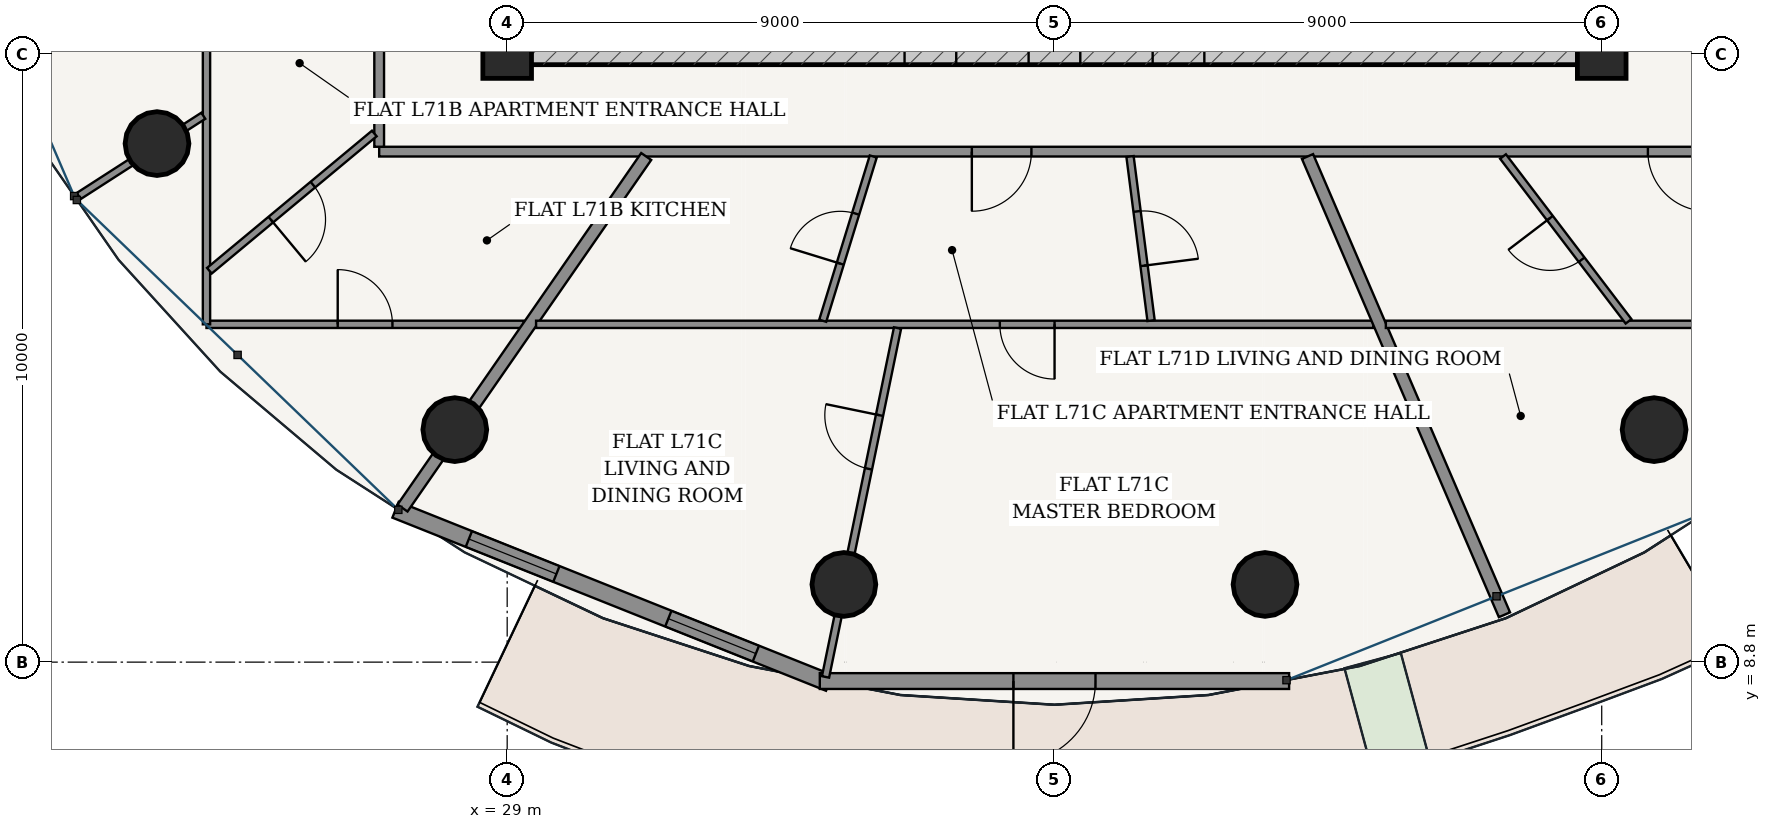
"""IFC4 building model, lengths in metres.
Left out: names, types, materials, properties, quantities, classifications, styles, units other than length and angle.
Written with IfcOpenShell. Run it as: python <this file> out.ifc"""

import sys

from ifc_helpers import new_model, si_unit, direction, frame, frame_2d, origin, origin_2d, place, context, subcontext, project, spatial, rectangle, hollow_circle, extrude, source, transform, mapped, element, fill, save


model = new_model("IFC4")
c1 = context("Model", 3, precision=1e-05, world=origin(), true_north=direction((-0.2419218956, 0.970295726276)))
c2 = subcontext(c1, "Body", "Model", "MODEL_VIEW")
j1 = project(units=[si_unit("LENGTHUNIT", "METRE"), si_unit("PLANEANGLEUNIT", "RADIAN")], contexts=[c1])
p1 = place(None, origin())
s1 = spatial("IfcSite", under=j1, at=p1, CompositionType="ELEMENT")
p2 = place(p1, origin())
s2 = spatial("IfcBuilding", under=s1, at=p2, CompositionType="ELEMENT")
p3 = place(p2, frame((0.0, 0.0, 270.7)))
s3 = spatial("IfcBuildingStorey", under=s2, at=p3, CompositionType="ELEMENT", Elevation=270.7)
for number, where, z_axis, x_axis in (
    (1, (29.0, 18.8, 0.0), (0.0, 0.0, 1.0), (1.0, 0.0, 0.0)),
    (2, (47.0, 18.8, 0.0), (0.0, 0.0, 1.0), (1.0, 0.0, 0.0)),
):
    element("IfcColumn", number, at=place(p3, frame(where, z_axis=z_axis, x_axis=x_axis)), inside=s3, PredefinedType="COLUMN", context=c2, shape_type="SweptSolid", body=[
        extrude(rectangle(XDim=0.8, YDim=0.8, at=origin_2d()), origin(), (0.0, 0.0, 1.0), 3.75),
    ])
p4 = place(p3, frame((28.825, 18.9, 0.0), z_axis=(0.0, 0.0, 1.0), x_axis=(1.0, 0.0, 0.0)))
e3 = element("IfcWall", 3, at=p4, inside=s3, PredefinedType="SHEAR", context=c2, shape_type="SweptSolid", body=[
    extrude(rectangle(XDim=18.35, YDim=0.55, at=frame_2d((9.175, 0.0))), origin(), (0.0, 0.0, 1.0), 3.49),
])
p5 = place(p4, frame((6.71, 0.0, 0.0)))
e4 = element("IfcOpeningElement", 4, at=p5, cuts=e3, PredefinedType="OPENING", context=c2, shape_type="SweptSolid", body=[
    extrude(rectangle(XDim=0.85, YDim=2.1, at=frame_2d((0.425, 1.05))), frame((0.0, 0.285, 0.0), z_axis=(0.0, -1.0, 0.0), x_axis=(1.0, 0.0, 0.0)), (0.0, 0.0, 1.0), 0.57),
])
p6 = place(p4, frame((8.75, 0.0, 0.0)))
e5 = element("IfcOpeningElement", 5, at=p6, cuts=e3, PredefinedType="OPENING", context=c2, shape_type="SweptSolid", body=[
    extrude(rectangle(XDim=0.85, YDim=2.1, at=frame_2d((0.425, 1.05))), frame((0.0, 0.285, 0.0), z_axis=(0.0, -1.0, 0.0), x_axis=(1.0, 0.0, 0.0)), (0.0, 0.0, 1.0), 0.57),
])
p7 = place(p4, frame((10.79, 0.0, 0.0)))
e6 = element("IfcOpeningElement", 6, at=p7, cuts=e3, PredefinedType="OPENING", context=c2, shape_type="SweptSolid", body=[
    extrude(rectangle(XDim=0.85, YDim=2.1, at=frame_2d((0.425, 1.05))), frame((0.0, 0.285, 0.0), z_axis=(0.0, -1.0, 0.0), x_axis=(1.0, 0.0, 0.0)), (0.0, 0.0, 1.0), 0.57),
])
for number, where, z_axis, x_axis in (
    (7, (23.241, 17.328, 0.0), (0.0, 0.0, 1.0), (1.0, 0.0, 0.0)),
    (8, (28.139, 12.624, 0.0), (0.0, 0.0, 1.0), (1.0, 0.0, 0.0)),
    (9, (34.537, 10.078, 0.0), (0.0, 0.0, 1.0), (1.0, 0.0, 0.0)),
    (10, (41.463, 10.078, 0.0), (0.0, 0.0, 1.0), (1.0, 0.0, 0.0)),
    (11, (47.861, 12.624, 0.0), (0.0, 0.0, 1.0), (1.0, 0.0, 0.0)),
):
    element("IfcColumn", number, at=place(p3, frame(where, z_axis=z_axis, x_axis=x_axis)), inside=s3, PredefinedType="COLUMN", context=c2, shape_type="SweptSolid", body=[
        extrude(hollow_circle(Radius=0.525, WallThickness=0.035, at=origin_2d()), origin(), (0.0, 0.0, 1.0), 3.75),
    ])
p8 = place(p3, frame((27.164, 11.306, 0.0), z_axis=(0.0, 0.0, 1.0), x_axis=(0.92871332341, -0.370798547626, 0.0)))
e12 = element("IfcWall", 12, at=p8, inside=s3, PredefinedType="SOLIDWALL", context=c2, shape_type="SweptSolid", body=[
    extrude(rectangle(XDim=7.678, YDim=0.28, at=frame_2d((3.839, 0.0))), origin(), (0.0, 0.0, 1.0), 3.49),
])
p9 = place(p8, frame((1.298, 0.0, 0.85)))
e13 = element("IfcOpeningElement", 13, at=p9, cuts=e12, PredefinedType="OPENING", context=c2, shape_type="SweptSolid", body=[
    extrude(rectangle(XDim=1.55, YDim=1.95, at=frame_2d((0.775, 0.975))), frame((0.0, 0.15, 0.0), z_axis=(0.0, -1.0, 0.0), x_axis=(1.0, 0.0, 0.0)), (0.0, 0.0, 1.0), 0.3),
])
p10 = place(p8, frame((4.83, 0.0, 0.85)))
e14 = element("IfcOpeningElement", 14, at=p10, cuts=e12, PredefinedType="OPENING", context=c2, shape_type="SweptSolid", body=[
    extrude(rectangle(XDim=1.55, YDim=1.95, at=frame_2d((0.775, 0.975))), frame((0.0, 0.15, 0.0), z_axis=(0.0, -1.0, 0.0), x_axis=(1.0, 0.0, 0.0)), (0.0, 0.0, 1.0), 0.3),
])
p11 = place(p3, frame((34.141, 8.489, 0.0), z_axis=(0.0, 0.0, 1.0), x_axis=(1.0, 0.0, 0.0)))
e15 = element("IfcWall", 15, at=p11, inside=s3, PredefinedType="SOLIDWALL", context=c2, shape_type="SweptSolid", body=[
    extrude(rectangle(XDim=7.718, YDim=0.26, at=frame_2d((3.859, 0.0))), origin(), (0.0, 0.0, 1.0), 3.49),
])
p12 = place(p11, frame((3.184, 0.0, 0.0)))
e16 = element("IfcOpeningElement", 16, at=p12, cuts=e15, PredefinedType="OPENING", context=c2, shape_type="SweptSolid", body=[
    extrude(rectangle(XDim=1.35, YDim=2.2, at=frame_2d((0.675, 1.1))), frame((0.0, 0.14, 0.0), z_axis=(0.0, -1.0, 0.0), x_axis=(1.0, 0.0, 0.0)), (0.0, 0.0, 1.0), 0.28),
])
p13 = place(p3, frame((26.895, 17.195, 0.0), z_axis=(0.0, 0.0, 1.0), x_axis=(1.0, 0.0, 0.0)))
e17 = element("IfcWall", 17, at=p13, inside=s3, PredefinedType="PARTITIONING", context=c2, shape_type="SweptSolid", body=[
    extrude(rectangle(XDim=22.21, YDim=0.16, at=frame_2d((11.105, 0.0))), origin(), (0.0, 0.0, 1.0), 3.015),
])
p14 = place(p13, frame((9.746, 0.0, 0.0)))
e18 = element("IfcOpeningElement", 18, at=p14, cuts=e17, PredefinedType="OPENING", context=c2, shape_type="SweptSolid", body=[
    extrude(rectangle(XDim=0.98, YDim=2.2, at=frame_2d((0.49, 1.1))), frame((0.0, 0.09, 0.0), z_axis=(0.0, -1.0, 0.0), x_axis=(1.0, 0.0, 0.0)), (0.0, 0.0, 1.0), 0.18),
])
p15 = place(p13, frame((20.864, 0.0, 0.0)))
e19 = element("IfcOpeningElement", 19, at=p15, cuts=e17, PredefinedType="OPENING", context=c2, shape_type="SweptSolid", body=[
    extrude(rectangle(XDim=0.98, YDim=2.2, at=frame_2d((0.49, 1.1))), frame((0.0, 0.09, 0.0), z_axis=(0.0, -1.0, 0.0), x_axis=(1.0, 0.0, 0.0)), (0.0, 0.0, 1.0), 0.18),
])
p16 = place(p3, frame((26.895, 17.275, 0.0), z_axis=(0.0, 0.0, 1.0), x_axis=(0.0, 1.0, 0.0)))
e20 = element("IfcWall", 20, at=p16, inside=s3, PredefinedType="PARTITIONING", context=c2, shape_type="SweptSolid", body=[
    extrude(rectangle(XDim=13.925, YDim=0.16, at=frame_2d((6.962, 0.0))), origin(), (0.0, 0.0, 1.0), 3.015),
])
p17 = place(p16, frame((2.735, 0.0, 0.0)))
e21 = element("IfcOpeningElement", 21, at=p17, cuts=e20, PredefinedType="OPENING", context=c2, shape_type="SweptSolid", body=[
    extrude(rectangle(XDim=0.98, YDim=2.2, at=frame_2d((0.49, 1.1))), frame((0.0, 0.09, 0.0), z_axis=(0.0, -1.0, 0.0), x_axis=(1.0, 0.0, 0.0)), (0.0, 0.0, 1.0), 0.18),
])
p18 = place(p3, frame((29.271, 14.355, 0.0), z_axis=(0.0, 0.0, 1.0), x_axis=(-1.0, 0.0, 0.0)))
e22 = element("IfcWall", 22, at=p18, inside=s3, PredefinedType="PARTITIONING", context=c2, shape_type="SweptSolid", body=[
    extrude(rectangle(XDim=5.216, YDim=0.12, at=frame_2d((2.608, 0.0))), origin(), (0.0, 0.0, 1.0), 3.015),
])
p19 = place(p18, frame((2.158, 0.0, 0.0)))
e23 = element("IfcOpeningElement", 23, at=p19, cuts=e22, PredefinedType="OPENING", context=c2, shape_type="SweptSolid", body=[
    extrude(rectangle(XDim=0.9, YDim=2.15, at=frame_2d((0.45, 1.075))), frame((0.0, 0.07, 0.0), z_axis=(0.0, -1.0, 0.0), x_axis=(1.0, 0.0, 0.0)), (0.0, 0.0, 1.0), 0.14),
])
p20 = place(p3, frame((24.055, 14.355, 0.0), z_axis=(0.0, 0.0, 1.0), x_axis=(0.0, 1.0, 0.0)))
e24 = element("IfcWall", 24, at=p20, inside=s3, PredefinedType="PARTITIONING", context=c2, shape_type="SweptSolid", body=[
    extrude(rectangle(XDim=12.343, YDim=0.12, at=frame_2d((6.171, 0.0))), origin(), (0.0, 0.0, 1.0), 3.015),
])
p21 = place(p20, frame((5.442, 0.0, 0.0)))
e25 = element("IfcOpeningElement", 25, at=p21, cuts=e24, PredefinedType="OPENING", context=c2, shape_type="SweptSolid", body=[
    extrude(rectangle(XDim=0.9, YDim=2.15, at=frame_2d((0.45, 1.075))), frame((0.0, 0.07, 0.0), z_axis=(0.0, -1.0, 0.0), x_axis=(1.0, 0.0, 0.0)), (0.0, 0.0, 1.0), 0.14),
])
p22 = place(p3, frame((24.003, 17.785, 0.0), z_axis=(0.0, 0.0, 1.0), x_axis=(-0.840715962824, -0.541476379774, 0.0)))
e26 = element("IfcWall", 26, at=p22, inside=s3, PredefinedType="PARTITIONING", context=c2, shape_type="SweptSolid", body=[
    extrude(rectangle(XDim=2.437, YDim=0.12, at=frame_2d((1.219, 0.0))), origin(), (0.0, 0.0, 1.0), 3.015),
])
p23 = place(p3, frame((26.815, 17.493, 0.0), z_axis=(0.0, 0.0, 1.0), x_axis=(-0.768708794437, -0.639598928513, 0.0)))
e27 = element("IfcWall", 27, at=p23, inside=s3, PredefinedType="PARTITIONING", context=c2, shape_type="SweptSolid", body=[
    extrude(rectangle(XDim=3.529, YDim=0.12, at=frame_2d((1.764, 0.0))), origin(), (0.0, 0.0, 1.0), 3.121),
])
p24 = place(p23, frame((1.314, 0.0, 0.0)))
e28 = element("IfcOpeningElement", 28, at=p24, cuts=e27, PredefinedType="OPENING", context=c2, shape_type="SweptSolid", body=[
    extrude(rectangle(XDim=0.9, YDim=2.15, at=frame_2d((0.45, 1.075))), frame((0.0, 0.07, 0.0), z_axis=(0.0, -1.0, 0.0), x_axis=(1.0, 0.0, 0.0)), (0.0, 0.0, 1.0), 0.14),
])
p25 = place(p3, frame((31.286, 17.115, 0.0), z_axis=(0.0, 0.0, 1.0), x_axis=(-0.569682734556, -0.821864698079, 0.0)))
e29 = element("IfcWall", 29, at=p25, inside=s3, PredefinedType="PARTITIONING", context=c2, shape_type="SweptSolid", body=[
    extrude(rectangle(XDim=7.034, YDim=0.2, at=frame_2d((3.517, 0.0))), origin(), (0.0, 0.0, 1.0), 3.015),
])
p26 = place(p3, frame((43.246, 14.355, 0.0), z_axis=(0.0, 0.0, 1.0), x_axis=(-1.0, 0.0, 0.0)))
e30 = element("IfcWall", 30, at=p26, inside=s3, PredefinedType="PARTITIONING", context=c2, shape_type="SweptSolid", body=[
    extrude(rectangle(XDim=13.771, YDim=0.12, at=frame_2d((6.885, 0.0))), origin(), (0.0, 0.0, 1.0), 3.015),
])
p27 = place(p26, frame((5.244, 0.0, 0.0)))
e31 = element("IfcOpeningElement", 31, at=p27, cuts=e30, PredefinedType="OPENING", context=c2, shape_type="SweptSolid", body=[
    extrude(rectangle(XDim=0.9, YDim=2.15, at=frame_2d((0.45, 1.075))), frame((0.0, 0.07, 0.0), z_axis=(0.0, -1.0, 0.0), x_axis=(1.0, 0.0, 0.0)), (0.0, 0.0, 1.0), 0.14),
])
p28 = place(p3, frame((35.419, 14.294, 0.0), z_axis=(0.0, 0.0, 1.0), x_axis=(-0.202123253109, -0.979360092383, 0.0)))
e32 = element("IfcWall", 32, at=p28, inside=s3, PredefinedType="PARTITIONING", context=c2, shape_type="SweptSolid", body=[
    extrude(rectangle(XDim=5.858, YDim=0.12, at=frame_2d((2.929, 0.0))), origin(), (0.0, 0.0, 1.0), 3.015),
])
p29 = place(p28, frame((1.464, 0.0, 0.0)))
e33 = element("IfcOpeningElement", 33, at=p29, cuts=e32, PredefinedType="OPENING", context=c2, shape_type="SweptSolid", body=[
    extrude(rectangle(XDim=0.9, YDim=2.15, at=frame_2d((0.45, 1.075))), frame((0.0, 0.07, 0.0), z_axis=(0.0, -1.0, 0.0), x_axis=(1.0, 0.0, 0.0)), (0.0, 0.0, 1.0), 0.14),
])
p30 = place(p3, frame((35.02, 17.115, 0.0), z_axis=(0.0, 0.0, 1.0), x_axis=(-0.294110134522, -0.955771535866, 0.0)))
e34 = element("IfcWall", 34, at=p30, inside=s3, PredefinedType="PARTITIONING", context=c2, shape_type="SweptSolid", body=[
    extrude(rectangle(XDim=2.826, YDim=0.12, at=frame_2d((1.413, 0.0))), origin(), (0.0, 0.0, 1.0), 3.209),
])
p31 = place(p30, frame((0.983, 0.0, 0.0)))
e35 = element("IfcOpeningElement", 35, at=p31, cuts=e34, PredefinedType="OPENING", context=c2, shape_type="SweptSolid", body=[
    extrude(rectangle(XDim=0.86, YDim=2.15, at=frame_2d((0.43, 1.075))), frame((0.0, 0.07, 0.0), z_axis=(0.0, -1.0, 0.0), x_axis=(1.0, 0.0, 0.0)), (0.0, 0.0, 1.0), 0.14),
])
p32 = place(p3, frame((39.243, 17.115, 0.0), z_axis=(0.0, 0.0, 1.0), x_axis=(0.127336357758, -0.991859592882, 0.0)))
e36 = element("IfcWall", 36, at=p32, inside=s3, PredefinedType="PARTITIONING", context=c2, shape_type="SweptSolid", body=[
    extrude(rectangle(XDim=2.721, YDim=0.12, at=frame_2d((1.36, 0.0))), origin(), (0.0, 0.0, 1.0), 3.209),
])
p33 = place(p32, frame((0.91, 0.0, 0.0)))
e37 = element("IfcOpeningElement", 37, at=p33, cuts=e36, PredefinedType="OPENING", context=c2, shape_type="SweptSolid", body=[
    extrude(rectangle(XDim=0.9, YDim=2.15, at=frame_2d((0.45, 1.075))), frame((0.0, 0.07, 0.0), z_axis=(0.0, -1.0, 0.0), x_axis=(1.0, 0.0, 0.0)), (0.0, 0.0, 1.0), 0.14),
])
p34 = place(p3, frame((42.162, 17.115, 0.0), z_axis=(0.0, 0.0, 1.0), x_axis=(0.394795631127, -0.918768964236, 0.0)))
e38 = element("IfcWall", 38, at=p34, inside=s3, PredefinedType="PARTITIONING", context=c2, shape_type="SweptSolid", body=[
    extrude(rectangle(XDim=8.202, YDim=0.2, at=frame_2d((4.101, 0.0))), origin(), (0.0, 0.0, 1.0), 3.121),
])
p35 = place(p3, frame((51.945, 14.355, 0.0), z_axis=(0.0, 0.0, 1.0), x_axis=(-1.0, 0.0, 0.0)))
e39 = element("IfcWall", 39, at=p35, inside=s3, PredefinedType="PARTITIONING", context=c2, shape_type="SweptSolid", body=[
    extrude(rectangle(XDim=8.495, YDim=0.12, at=frame_2d((4.248, 0.0))), origin(), (0.0, 0.0, 1.0), 3.015),
])
p36 = place(p35, frame((2.164, 0.0, 0.0)))
e40 = element("IfcOpeningElement", 40, at=p36, cuts=e39, PredefinedType="OPENING", context=c2, shape_type="SweptSolid", body=[
    extrude(rectangle(XDim=0.9, YDim=2.15, at=frame_2d((0.45, 1.075))), frame((0.0, 0.07, 0.0), z_axis=(0.0, -1.0, 0.0), x_axis=(1.0, 0.0, 0.0)), (0.0, 0.0, 1.0), 0.14),
])
p37 = place(p3, frame((45.377, 17.115, 0.0), z_axis=(0.0, 0.0, 1.0), x_axis=(0.60588776962, -0.795550130806, 0.0)))
e41 = element("IfcWall", 41, at=p37, inside=s3, PredefinedType="PARTITIONING", context=c2, shape_type="SweptSolid", body=[
    extrude(rectangle(XDim=3.407, YDim=0.12, at=frame_2d((1.704, 0.0))), origin(), (0.0, 0.0, 1.0), 3.209),
])
p38 = place(p37, frame((1.274, 0.0, 0.0)))
e42 = element("IfcOpeningElement", 42, at=p38, cuts=e41, PredefinedType="OPENING", context=c2, shape_type="SweptSolid", body=[
    extrude(rectangle(XDim=0.86, YDim=2.15, at=frame_2d((0.43, 1.075))), frame((0.0, 0.07, 0.0), z_axis=(0.0, -1.0, 0.0), x_axis=(1.0, 0.0, 0.0)), (0.0, 0.0, 1.0), 0.14),
])
m1 = source(origin(), c2, "Body", "SweptSolid", [
    extrude(rectangle(XDim=1.55, YDim=1.95, at=frame_2d((0.775, 0.975))), frame((0.0, 0.03, 0.0), z_axis=(0.0, -1.0, 0.0), x_axis=(1.0, 0.0, 0.0)), (0.0, 0.0, 1.0), 0.06),
])
p39 = place(p9, origin())
e43 = element("IfcWindow", 43, at=p39, inside=s3, PartitioningType="SINGLE_PANEL", PredefinedType="WINDOW", context=c2, shape_type="MappedRepresentation", body=[
    mapped(m1, transform((0.0, 0.0, 0.0), scale=1.0)),
])
fill(e13, e43)
p40 = place(p10, origin())
e44 = element("IfcWindow", 44, at=p40, inside=s3, PartitioningType="SINGLE_PANEL", PredefinedType="WINDOW", context=c2, shape_type="MappedRepresentation", body=[
    mapped(m1, transform((0.0, 0.0, 0.0), scale=1.0)),
])
fill(e14, e44)
m2 = source(origin(), c2, "Body", "SweptSolid", [
    extrude(rectangle(XDim=1.35, YDim=2.2, at=frame_2d((0.675, 1.1))), frame((0.0, 0.025, 0.0), z_axis=(0.0, -1.0, 0.0), x_axis=(1.0, 0.0, 0.0)), (0.0, 0.0, 1.0), 0.05),
])
p41 = place(p12, frame((1.35, 0.0, 0.0), z_axis=(0.0, 0.0, 1.0), x_axis=(-1.0, 0.0, 0.0)))
e45 = element("IfcDoor", 45, at=p41, inside=s3, OperationType="SINGLE_SWING_RIGHT", PredefinedType="DOOR", context=c2, shape_type="MappedRepresentation", body=[
    mapped(m2, transform((0.0, 0.0, 0.0), scale=1.0)),
])
fill(e16, e45)
m3 = source(origin(), c2, "Body", "SweptSolid", [
    extrude(rectangle(XDim=0.9, YDim=2.15, at=frame_2d((0.45, 1.075))), frame((0.0, 0.025, 0.0), z_axis=(0.0, -1.0, 0.0), x_axis=(1.0, 0.0, 0.0)), (0.0, 0.0, 1.0), 0.05),
])
p42 = place(p24, origin())
e46 = element("IfcDoor", 46, at=p42, inside=s3, OperationType="SINGLE_SWING_RIGHT", PredefinedType="DOOR", context=c2, shape_type="MappedRepresentation", body=[
    mapped(m3, transform((0.0, 0.0, 0.0), scale=1.0)),
])
fill(e28, e46)
p43 = place(p19, frame((0.9, 0.0, 0.0), z_axis=(0.0, 0.0, 1.0), x_axis=(-1.0, 0.0, 0.0)))
e47 = element("IfcDoor", 47, at=p43, inside=s3, OperationType="SINGLE_SWING_LEFT", PredefinedType="DOOR", context=c2, shape_type="MappedRepresentation", body=[
    mapped(m3, transform((0.0, 0.0, 0.0), scale=1.0)),
])
fill(e23, e47)
m4 = source(origin(), c2, "Body", "SweptSolid", [
    extrude(rectangle(XDim=0.98, YDim=2.2, at=frame_2d((0.49, 1.1))), frame((0.0, 0.025, 0.0), z_axis=(0.0, -1.0, 0.0), x_axis=(1.0, 0.0, 0.0)), (0.0, 0.0, 1.0), 0.05),
])
p44 = place(p14, frame((0.98, 0.0, 0.0), z_axis=(0.0, 0.0, 1.0), x_axis=(-1.0, 0.0, 0.0)))
e48 = element("IfcDoor", 48, at=p44, inside=s3, OperationType="SINGLE_SWING_RIGHT", PredefinedType="DOOR", context=c2, shape_type="MappedRepresentation", body=[
    mapped(m4, transform((0.0, 0.0, 0.0), scale=1.0)),
])
fill(e18, e48)
m5 = source(origin(), c2, "Body", "SweptSolid", [
    extrude(rectangle(XDim=0.86, YDim=2.15, at=frame_2d((0.43, 1.075))), frame((0.0, 0.025, 0.0), z_axis=(0.0, -1.0, 0.0), x_axis=(1.0, 0.0, 0.0)), (0.0, 0.0, 1.0), 0.05),
])
p45 = place(p31, frame((0.86, 0.0, 0.0), z_axis=(0.0, 0.0, 1.0), x_axis=(-1.0, 0.0, 0.0)))
e49 = element("IfcDoor", 49, at=p45, inside=s3, OperationType="SINGLE_SWING_LEFT", PredefinedType="DOOR", context=c2, shape_type="MappedRepresentation", body=[
    mapped(m5, transform((0.0, 0.0, 0.0), scale=1.0)),
])
fill(e35, e49)
p46 = place(p33, origin())
e50 = element("IfcDoor", 50, at=p46, inside=s3, OperationType="SINGLE_SWING_RIGHT", PredefinedType="DOOR", context=c2, shape_type="MappedRepresentation", body=[
    mapped(m3, transform((0.0, 0.0, 0.0), scale=1.0)),
])
fill(e37, e50)
p47 = place(p27, origin())
e51 = element("IfcDoor", 51, at=p47, inside=s3, OperationType="SINGLE_SWING_LEFT", PredefinedType="DOOR", context=c2, shape_type="MappedRepresentation", body=[
    mapped(m3, transform((0.0, 0.0, 0.0), scale=1.0)),
])
fill(e31, e51)
p48 = place(p29, frame((0.9, 0.0, 0.0), z_axis=(0.0, 0.0, 1.0), x_axis=(-1.0, 0.0, 0.0)))
e52 = element("IfcDoor", 52, at=p48, inside=s3, OperationType="SINGLE_SWING_RIGHT", PredefinedType="DOOR", context=c2, shape_type="MappedRepresentation", body=[
    mapped(m3, transform((0.0, 0.0, 0.0), scale=1.0)),
])
fill(e33, e52)
p49 = place(p15, frame((0.98, 0.0, 0.0), z_axis=(0.0, 0.0, 1.0), x_axis=(-1.0, 0.0, 0.0)))
e53 = element("IfcDoor", 53, at=p49, inside=s3, OperationType="SINGLE_SWING_LEFT", PredefinedType="DOOR", context=c2, shape_type="MappedRepresentation", body=[
    mapped(m4, transform((0.0, 0.0, 0.0), scale=1.0)),
])
fill(e19, e53)
p50 = place(p38, frame((0.86, 0.0, 0.0), z_axis=(0.0, 0.0, 1.0), x_axis=(-1.0, 0.0, 0.0)))
e54 = element("IfcDoor", 54, at=p50, inside=s3, OperationType="SINGLE_SWING_RIGHT", PredefinedType="DOOR", context=c2, shape_type="MappedRepresentation", body=[
    mapped(m5, transform((0.0, 0.0, 0.0), scale=1.0)),
])
fill(e42, e54)
save(model, sys.argv[1])
